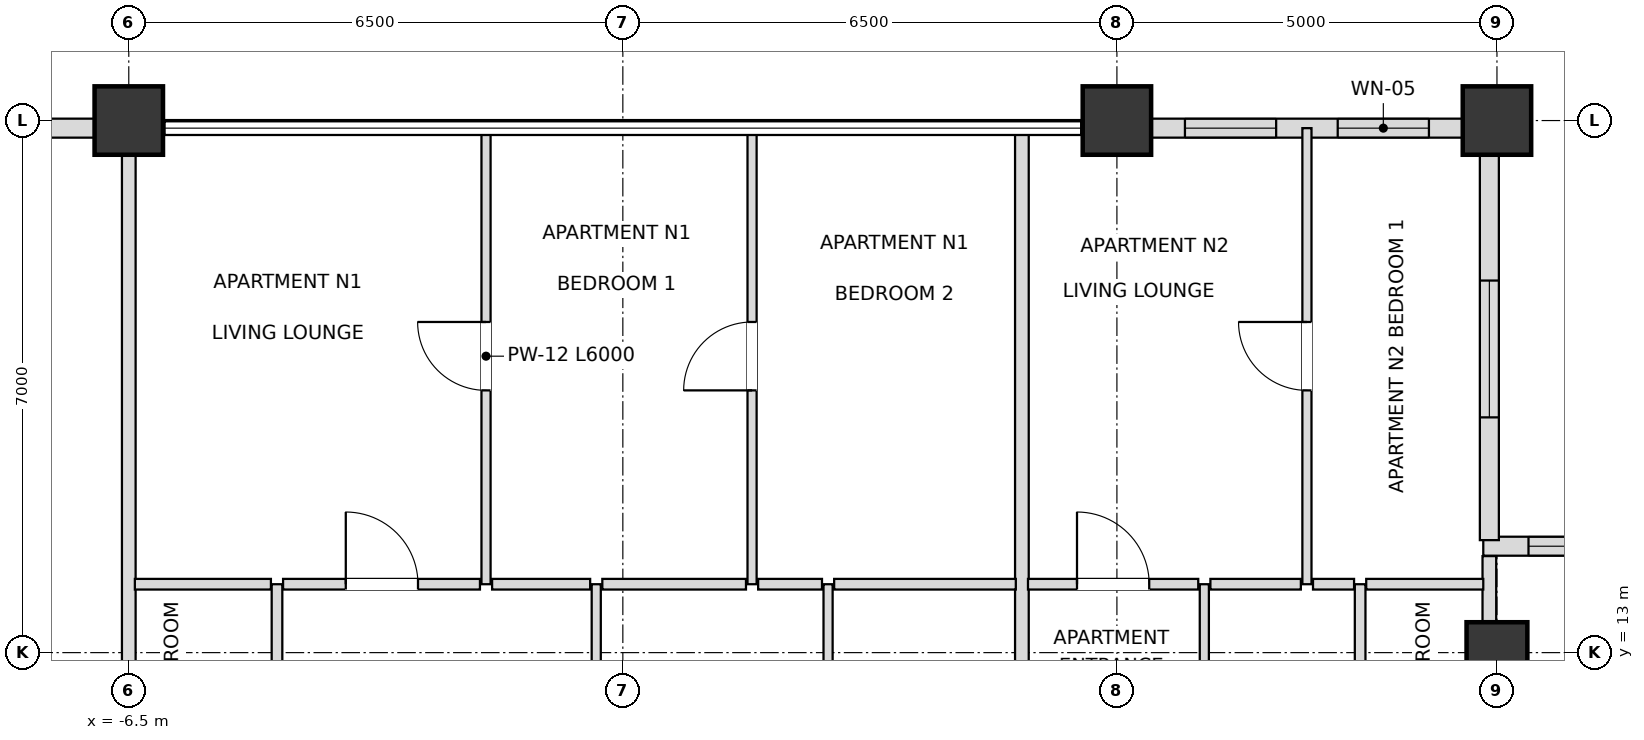
"""IFC4 building model, lengths in metres.
Left out: names, types, materials, properties, quantities, classifications, styles, units other than length and angle.
Written with IfcOpenShell. Run it as: python <this file> out.ifc"""

import sys

from ifc_helpers import new_model, si_unit, direction, frame, frame_2d, origin, origin_2d, place, context, subcontext, project, spatial, rectangle, extrude, element, fill, save


model = new_model("IFC4")
c1 = context("Model", 3, precision=1e-05, world=origin(), true_north=direction((0.0, 1.0)))
c2 = subcontext(c1, "Body", "Model", "MODEL_VIEW")
j1 = project(units=[si_unit("LENGTHUNIT", "METRE"), si_unit("PLANEANGLEUNIT", "RADIAN")], contexts=[c1])
p1 = place(None, origin())
s1 = spatial("IfcSite", under=j1, at=p1, CompositionType="ELEMENT")
p2 = place(p1, origin())
s2 = spatial("IfcBuilding", under=s1, at=p2, CompositionType="ELEMENT")
p3 = place(p2, frame((0.0, 0.0, 225.9)))
s3 = spatial("IfcBuildingStorey", under=s2, at=p3, CompositionType="ELEMENT", Elevation=225.9)
for number, where, z_axis, x_axis in (
    (1, (11.5, 20.0, 0.0), (0.0, 0.0, 1.0), (1.0, 0.0, 0.0)),
    (2, (6.5, 20.0, 0.0), (0.0, 0.0, 1.0), (1.0, 0.0, 0.0)),
    (3, (-6.5, 20.0, 0.0), (0.0, 0.0, 1.0), (1.0, 0.0, 0.0)),
):
    element("IfcColumn", number, at=place(p3, frame(where, z_axis=z_axis, x_axis=x_axis)), inside=s3, PredefinedType="USERDEFINED", context=c2, shape_type="SweptSolid", body=[
        extrude(rectangle(XDim=0.9, YDim=0.9, at=origin_2d()), origin(), (0.0, 0.0, 1.0), 3.6),
    ])
p4 = place(p3, frame((11.5, 13.0, 0.0), z_axis=(0.0, 0.0, 1.0), x_axis=(1.0, 0.0, 0.0)))
e4 = element("IfcColumn", 4, at=p4, inside=s3, PredefinedType="COLUMN", context=c2, shape_type="SweptSolid", body=[
    extrude(rectangle(XDim=0.8, YDim=0.8, at=origin_2d()), origin(), (0.0, 0.0, 1.0), 3.6),
])
p5 = place(p3, frame((11.055, 19.9, 0.0), z_axis=(0.0, 0.0, 1.0), x_axis=(-1.0, 0.0, 0.0)))
e5 = element("IfcWall", 5, at=p5, inside=s3, PredefinedType="SOLIDWALL", context=c2, shape_type="SweptSolid", body=[
    extrude(rectangle(XDim=4.11, YDim=0.25, at=frame_2d((2.055, 0.0))), origin(), (0.0, 0.0, 1.0), 2.748),
])
p6 = place(p5, frame((0.45, 0.0, 0.72)))
e6 = element("IfcOpeningElement", 6, at=p6, cuts=e5, PredefinedType="OPENING", context=c2, shape_type="SweptSolid", body=[
    extrude(rectangle(XDim=1.2, YDim=1.68, at=frame_2d((0.6, 0.84))), frame((0.0, 0.135, 0.0), z_axis=(0.0, -1.0, 0.0), x_axis=(1.0, 0.0, 0.0)), (0.0, 0.0, 1.0), 0.27),
])
p7 = place(p5, frame((2.46, 0.0, 0.72)))
e7 = element("IfcOpeningElement", 7, at=p7, cuts=e5, PredefinedType="OPENING", context=c2, shape_type="SweptSolid", body=[
    extrude(rectangle(XDim=1.2, YDim=1.68, at=frame_2d((0.6, 0.84))), frame((0.0, 0.135, 0.0), z_axis=(0.0, -1.0, 0.0), x_axis=(1.0, 0.0, 0.0)), (0.0, 0.0, 1.0), 0.27),
])
p8 = place(p3, frame((-6.945, 19.9, 0.0), z_axis=(0.0, 0.0, 1.0), x_axis=(-1.0, 0.0, 0.0)))
e8 = element("IfcWall", 8, at=p8, inside=s3, PredefinedType="SOLIDWALL", context=c2, shape_type="SweptSolid", body=[
    extrude(rectangle(XDim=4.11, YDim=0.25, at=frame_2d((2.055, 0.0))), origin(), (0.0, 0.0, 1.0), 2.748),
])
p9 = place(p8, frame((1.155, 0.0, 0.72)))
e9 = element("IfcOpeningElement", 9, at=p9, cuts=e8, PredefinedType="OPENING", context=c2, shape_type="SweptSolid", body=[
    extrude(rectangle(XDim=1.8, YDim=1.68, at=frame_2d((0.9, 0.84))), frame((0.0, 0.135, 0.0), z_axis=(0.0, -1.0, 0.0), x_axis=(1.0, 0.0, 0.0)), (0.0, 0.0, 1.0), 0.27),
])
p10 = place(p3, frame((16.98, 14.4, 0.0), z_axis=(0.0, 0.0, 1.0), x_axis=(-1.0, 0.0, 0.0)))
e10 = element("IfcWall", 10, at=p10, inside=s3, PredefinedType="SOLIDWALL", context=c2, shape_type="SweptSolid", body=[
    extrude(rectangle(XDim=5.66, YDim=0.25, at=frame_2d((2.83, 0.0))), origin(), (0.0, 0.0, 1.0), 2.748),
])
p11 = place(p10, frame((0.595, 0.0, 0.72)))
e11 = element("IfcOpeningElement", 11, at=p11, cuts=e10, PredefinedType="OPENING", context=c2, shape_type="SweptSolid", body=[
    extrude(rectangle(XDim=1.8, YDim=1.68, at=frame_2d((0.9, 0.84))), frame((0.0, 0.135, 0.0), z_axis=(0.0, -1.0, 0.0), x_axis=(1.0, 0.0, 0.0)), (0.0, 0.0, 1.0), 0.27),
])
p12 = place(p10, frame((3.265, 0.0, 0.72)))
e12 = element("IfcOpeningElement", 12, at=p12, cuts=e10, PredefinedType="OPENING", context=c2, shape_type="SweptSolid", body=[
    extrude(rectangle(XDim=1.8, YDim=1.68, at=frame_2d((0.9, 0.84))), frame((0.0, 0.135, 0.0), z_axis=(0.0, -1.0, 0.0), x_axis=(1.0, 0.0, 0.0)), (0.0, 0.0, 1.0), 0.27),
])
p13 = place(p3, frame((11.4, 14.48, 0.0), z_axis=(0.0, 0.0, 1.0), x_axis=(0.0, 1.0, 0.0)))
e13 = element("IfcWall", 13, at=p13, inside=s3, PredefinedType="SOLIDWALL", context=c2, shape_type="SweptSolid", body=[
    extrude(rectangle(XDim=5.34, YDim=0.25, at=frame_2d((2.67, 0.0))), origin(), (0.0, 0.0, 1.0), 2.748),
])
p14 = place(p13, frame((1.615, 0.0, 0.72)))
e14 = element("IfcOpeningElement", 14, at=p14, cuts=e13, PredefinedType="OPENING", context=c2, shape_type="SweptSolid", body=[
    extrude(rectangle(XDim=1.8, YDim=1.68, at=frame_2d((0.9, 0.84))), frame((0.0, 0.135, 0.0), z_axis=(0.0, -1.0, 0.0), x_axis=(1.0, 0.0, 0.0)), (0.0, 0.0, 1.0), 0.27),
])
p15 = place(p3, frame((-6.5, 9.2, 0.0), z_axis=(0.0, 0.0, 1.0), x_axis=(0.0, 1.0, 0.0)))
e15 = element("IfcWall", 15, at=p15, inside=s3, PredefinedType="PARTITIONING", context=c2, shape_type="SweptSolid", body=[
    extrude(rectangle(XDim=10.7, YDim=0.18, at=frame_2d((5.35, 0.0))), origin(), (0.0, 0.0, 1.0), 2.826),
])
p16 = place(p3, frame((-4.55, 9.2, 0.0), z_axis=(0.0, 0.0, 1.0), x_axis=(0.0, 1.0, 0.0)))
e16 = element("IfcWall", 16, at=p16, inside=s3, PredefinedType="PARTITIONING", context=c2, shape_type="SweptSolid", body=[
    extrude(rectangle(XDim=4.7, YDim=0.14, at=frame_2d((2.35, 0.0))), origin(), (0.0, 0.0, 1.0), 3.38),
])
p17 = place(p16, frame((1.9, 0.0, 0.0)))
e17 = element("IfcOpeningElement", 17, at=p17, cuts=e16, PredefinedType="OPENING", context=c2, shape_type="SweptSolid", body=[
    extrude(rectangle(XDim=0.9, YDim=2.1, at=frame_2d((0.45, 1.05))), frame((0.0, 0.08, 0.0), z_axis=(0.0, -1.0, 0.0), x_axis=(1.0, 0.0, 0.0)), (0.0, 0.0, 1.0), 0.16),
])
p18 = place(p3, frame((-1.8, 13.9, 0.0), z_axis=(0.0, 0.0, 1.0), x_axis=(0.0, 1.0, 0.0)))
e18 = element("IfcWall", 18, at=p18, inside=s3, PredefinedType="PARTITIONING", context=c2, shape_type="SweptSolid", body=[
    extrude(rectangle(XDim=6.0, YDim=0.12, at=frame_2d((3.0, 0.0))), origin(), (0.0, 0.0, 1.0), 3.018),
])
p19 = place(p18, frame((2.55, 0.0, 0.0)))
e19 = element("IfcOpeningElement", 19, at=p19, cuts=e18, PredefinedType="OPENING", context=c2, shape_type="SweptSolid", body=[
    extrude(rectangle(XDim=0.9, YDim=2.1, at=frame_2d((0.45, 1.05))), frame((0.0, 0.07, 0.0), z_axis=(0.0, -1.0, 0.0), x_axis=(1.0, 0.0, 0.0)), (0.0, 0.0, 1.0), 0.14),
])
p20 = place(p3, frame((-0.35, 9.2, 0.0), z_axis=(0.0, 0.0, 1.0), x_axis=(0.0, 1.0, 0.0)))
e20 = element("IfcWall", 20, at=p20, inside=s3, PredefinedType="PARTITIONING", context=c2, shape_type="SweptSolid", body=[
    extrude(rectangle(XDim=4.7, YDim=0.12, at=frame_2d((2.35, 0.0))), origin(), (0.0, 0.0, 1.0), 3.38),
])
p21 = place(p20, frame((1.875, 0.0, 0.0)))
e21 = element("IfcOpeningElement", 21, at=p21, cuts=e20, PredefinedType="OPENING", context=c2, shape_type="SweptSolid", body=[
    extrude(rectangle(XDim=0.95, YDim=2.1, at=frame_2d((0.475, 1.05))), frame((0.0, 0.07, 0.0), z_axis=(0.0, -1.0, 0.0), x_axis=(1.0, 0.0, 0.0)), (0.0, 0.0, 1.0), 0.14),
])
p22 = place(p3, frame((1.7, 13.9, 0.0), z_axis=(0.0, 0.0, 1.0), x_axis=(0.0, 1.0, 0.0)))
e22 = element("IfcWall", 22, at=p22, inside=s3, PredefinedType="PARTITIONING", context=c2, shape_type="SweptSolid", body=[
    extrude(rectangle(XDim=6.0, YDim=0.12, at=frame_2d((3.0, 0.0))), origin(), (0.0, 0.0, 1.0), 3.018),
])
p23 = place(p22, frame((2.55, 0.0, 0.0)))
e23 = element("IfcOpeningElement", 23, at=p23, cuts=e22, PredefinedType="OPENING", context=c2, shape_type="SweptSolid", body=[
    extrude(rectangle(XDim=0.9, YDim=2.1, at=frame_2d((0.45, 1.05))), frame((0.0, 0.07, 0.0), z_axis=(0.0, -1.0, 0.0), x_axis=(1.0, 0.0, 0.0)), (0.0, 0.0, 1.0), 0.14),
])
p24 = place(p3, frame((2.7, 9.2, 0.0), z_axis=(0.0, 0.0, 1.0), x_axis=(0.0, 1.0, 0.0)))
e24 = element("IfcWall", 24, at=p24, inside=s3, PredefinedType="PARTITIONING", context=c2, shape_type="SweptSolid", body=[
    extrude(rectangle(XDim=4.7, YDim=0.12, at=frame_2d((2.35, 0.0))), origin(), (0.0, 0.0, 1.0), 3.38),
])
p25 = place(p24, frame((1.9, 0.0, 0.0)))
e25 = element("IfcOpeningElement", 25, at=p25, cuts=e24, PredefinedType="OPENING", context=c2, shape_type="SweptSolid", body=[
    extrude(rectangle(XDim=0.9, YDim=2.1, at=frame_2d((0.45, 1.05))), frame((0.0, 0.07, 0.0), z_axis=(0.0, -1.0, 0.0), x_axis=(1.0, 0.0, 0.0)), (0.0, 0.0, 1.0), 0.14),
])
p26 = place(p3, frame((5.25, 9.2, 0.0), z_axis=(0.0, 0.0, 1.0), x_axis=(0.0, 1.0, 0.0)))
e26 = element("IfcWall", 26, at=p26, inside=s3, PredefinedType="PARTITIONING", context=c2, shape_type="SweptSolid", body=[
    extrude(rectangle(XDim=10.7, YDim=0.18, at=frame_2d((5.35, 0.0))), origin(), (0.0, 0.0, 1.0), 3.018),
])
p27 = place(p3, frame((7.65, 9.2, 0.0), z_axis=(0.0, 0.0, 1.0), x_axis=(0.0, 1.0, 0.0)))
e27 = element("IfcWall", 27, at=p27, inside=s3, PredefinedType="PARTITIONING", context=c2, shape_type="SweptSolid", body=[
    extrude(rectangle(XDim=4.7, YDim=0.12, at=frame_2d((2.35, 0.0))), origin(), (0.0, 0.0, 1.0), 2.826),
])
p28 = place(p27, frame((1.875, 0.0, 0.0)))
e28 = element("IfcOpeningElement", 28, at=p28, cuts=e27, PredefinedType="OPENING", context=c2, shape_type="SweptSolid", body=[
    extrude(rectangle(XDim=0.95, YDim=2.1, at=frame_2d((0.475, 1.05))), frame((0.0, 0.07, 0.0), z_axis=(0.0, -1.0, 0.0), x_axis=(1.0, 0.0, 0.0)), (0.0, 0.0, 1.0), 0.14),
])
p29 = place(p3, frame((9.0, 13.9, 0.0), z_axis=(0.0, 0.0, 1.0), x_axis=(0.0, 1.0, 0.0)))
e29 = element("IfcWall", 29, at=p29, inside=s3, PredefinedType="PARTITIONING", context=c2, shape_type="SweptSolid", body=[
    extrude(rectangle(XDim=6.0, YDim=0.12, at=frame_2d((3.0, 0.0))), origin(), (0.0, 0.0, 1.0), 3.38),
])
p30 = place(p29, frame((2.55, 0.0, 0.0)))
e30 = element("IfcOpeningElement", 30, at=p30, cuts=e29, PredefinedType="OPENING", context=c2, shape_type="SweptSolid", body=[
    extrude(rectangle(XDim=0.9, YDim=2.1, at=frame_2d((0.45, 1.05))), frame((0.0, 0.07, 0.0), z_axis=(0.0, -1.0, 0.0), x_axis=(1.0, 0.0, 0.0)), (0.0, 0.0, 1.0), 0.14),
])
p31 = place(p3, frame((9.7, 9.2, 0.0), z_axis=(0.0, 0.0, 1.0), x_axis=(0.0, 1.0, 0.0)))
e31 = element("IfcWall", 31, at=p31, inside=s3, PredefinedType="PARTITIONING", context=c2, shape_type="SweptSolid", body=[
    extrude(rectangle(XDim=4.7, YDim=0.14, at=frame_2d((2.35, 0.0))), origin(), (0.0, 0.0, 1.0), 2.826),
])
p32 = place(p31, frame((1.9, 0.0, 0.0)))
e32 = element("IfcOpeningElement", 32, at=p32, cuts=e31, PredefinedType="OPENING", context=c2, shape_type="SweptSolid", body=[
    extrude(rectangle(XDim=0.9, YDim=2.1, at=frame_2d((0.45, 1.05))), frame((0.0, 0.08, 0.0), z_axis=(0.0, -1.0, 0.0), x_axis=(1.0, 0.0, 0.0)), (0.0, 0.0, 1.0), 0.16),
])
p33 = place(p3, frame((11.4, 9.2, 0.0), z_axis=(0.0, 0.0, 1.0), x_axis=(0.0, 1.0, 0.0)))
e33 = element("IfcWall", 33, at=p33, inside=s3, PredefinedType="PARTITIONING", context=c2, shape_type="SweptSolid", body=[
    extrude(rectangle(XDim=5.07, YDim=0.18, at=frame_2d((2.535, 0.0))), origin(), (0.0, 0.0, 1.0), 2.748),
])
p34 = place(p3, frame((-6.42, 13.9, 0.0), z_axis=(0.0, 0.0, 1.0), x_axis=(1.0, 0.0, 0.0)))
e34 = element("IfcWall", 34, at=p34, inside=s3, PredefinedType="PARTITIONING", context=c2, shape_type="SweptSolid", body=[
    extrude(rectangle(XDim=1.79, YDim=0.14, at=frame_2d((0.895, 0.0))), origin(), (0.0, 0.0, 1.0), 3.38),
])
p35 = place(p3, frame((-4.47, 13.9, 0.0), z_axis=(0.0, 0.0, 1.0), x_axis=(1.0, 0.0, 0.0)))
e35 = element("IfcWall", 35, at=p35, inside=s3, PredefinedType="PARTITIONING", context=c2, shape_type="SweptSolid", body=[
    extrude(rectangle(XDim=2.59, YDim=0.14, at=frame_2d((1.295, 0.0))), origin(), (0.0, 0.0, 1.0), 3.38),
])
p36 = place(p35, frame((0.825, 0.0, 0.0)))
e36 = element("IfcOpeningElement", 36, at=p36, cuts=e35, PredefinedType="OPENING", context=c2, shape_type="SweptSolid", body=[
    extrude(rectangle(XDim=0.95, YDim=2.1, at=frame_2d((0.475, 1.05))), frame((0.0, 0.08, 0.0), z_axis=(0.0, -1.0, 0.0), x_axis=(1.0, 0.0, 0.0)), (0.0, 0.0, 1.0), 0.16),
])
p37 = place(p3, frame((-1.72, 13.9, 0.0), z_axis=(0.0, 0.0, 1.0), x_axis=(1.0, 0.0, 0.0)))
e37 = element("IfcWall", 37, at=p37, inside=s3, PredefinedType="PARTITIONING", context=c2, shape_type="SweptSolid", body=[
    extrude(rectangle(XDim=1.29, YDim=0.14, at=frame_2d((0.645, 0.0))), origin(), (0.0, 0.0, 1.0), 3.38),
])
p38 = place(p3, frame((-0.27, 13.9, 0.0), z_axis=(0.0, 0.0, 1.0), x_axis=(1.0, 0.0, 0.0)))
e38 = element("IfcWall", 38, at=p38, inside=s3, PredefinedType="PARTITIONING", context=c2, shape_type="SweptSolid", body=[
    extrude(rectangle(XDim=1.89, YDim=0.14, at=frame_2d((0.945, 0.0))), origin(), (0.0, 0.0, 1.0), 3.38),
])
p39 = place(p3, frame((1.78, 13.9, 0.0), z_axis=(0.0, 0.0, 1.0), x_axis=(1.0, 0.0, 0.0)))
e39 = element("IfcWall", 39, at=p39, inside=s3, PredefinedType="PARTITIONING", context=c2, shape_type="SweptSolid", body=[
    extrude(rectangle(XDim=0.84, YDim=0.14, at=frame_2d((0.42, 0.0))), origin(), (0.0, 0.0, 1.0), 3.38),
])
p40 = place(p3, frame((2.78, 13.9, 0.0), z_axis=(0.0, 0.0, 1.0), x_axis=(1.0, 0.0, 0.0)))
e40 = element("IfcWall", 40, at=p40, inside=s3, PredefinedType="PARTITIONING", context=c2, shape_type="SweptSolid", body=[
    extrude(rectangle(XDim=2.39, YDim=0.14, at=frame_2d((1.195, 0.0))), origin(), (0.0, 0.0, 1.0), 3.38),
])
p41 = place(p3, frame((5.33, 13.9, 0.0), z_axis=(0.0, 0.0, 1.0), x_axis=(1.0, 0.0, 0.0)))
e41 = element("IfcWall", 41, at=p41, inside=s3, PredefinedType="PARTITIONING", context=c2, shape_type="SweptSolid", body=[
    extrude(rectangle(XDim=2.24, YDim=0.14, at=frame_2d((1.12, 0.0))), origin(), (0.0, 0.0, 1.0), 2.826),
])
p42 = place(p41, frame((0.645, 0.0, 0.0)))
e42 = element("IfcOpeningElement", 42, at=p42, cuts=e41, PredefinedType="OPENING", context=c2, shape_type="SweptSolid", body=[
    extrude(rectangle(XDim=0.95, YDim=2.1, at=frame_2d((0.475, 1.05))), frame((0.0, 0.08, 0.0), z_axis=(0.0, -1.0, 0.0), x_axis=(1.0, 0.0, 0.0)), (0.0, 0.0, 1.0), 0.16),
])
p43 = place(p3, frame((7.73, 13.9, 0.0), z_axis=(0.0, 0.0, 1.0), x_axis=(1.0, 0.0, 0.0)))
e43 = element("IfcWall", 43, at=p43, inside=s3, PredefinedType="PARTITIONING", context=c2, shape_type="SweptSolid", body=[
    extrude(rectangle(XDim=1.19, YDim=0.14, at=frame_2d((0.595, 0.0))), origin(), (0.0, 0.0, 1.0), 3.38),
])
p44 = place(p3, frame((9.08, 13.9, 0.0), z_axis=(0.0, 0.0, 1.0), x_axis=(1.0, 0.0, 0.0)))
e44 = element("IfcWall", 44, at=p44, inside=s3, PredefinedType="PARTITIONING", context=c2, shape_type="SweptSolid", body=[
    extrude(rectangle(XDim=0.54, YDim=0.14, at=frame_2d((0.27, 0.0))), origin(), (0.0, 0.0, 1.0), 3.38),
])
p45 = place(p3, frame((9.78, 13.9, 0.0), z_axis=(0.0, 0.0, 1.0), x_axis=(1.0, 0.0, 0.0)))
e45 = element("IfcWall", 45, at=p45, inside=s3, PredefinedType="PARTITIONING", context=c2, shape_type="SweptSolid", body=[
    extrude(rectangle(XDim=1.54, YDim=0.14, at=frame_2d((0.77, 0.0))), origin(), (0.0, 0.0, 1.0), 3.38),
])
p46 = place(p6, origin())
e46 = element("IfcWindow", 46, at=p46, inside=s3, PartitioningType="SINGLE_PANEL", PredefinedType="WINDOW", context=c2, shape_type="SweptSolid", body=[
    extrude(rectangle(XDim=1.2, YDim=1.68, at=frame_2d((0.6, 0.84))), frame((0.0, 0.03, 0.0), z_axis=(0.0, -1.0, 0.0), x_axis=(1.0, 0.0, 0.0)), (0.0, 0.0, 1.0), 0.06),
])
fill(e6, e46)
p47 = place(p7, origin())
e47 = element("IfcWindow", 47, at=p47, inside=s3, PartitioningType="SINGLE_PANEL", PredefinedType="WINDOW", context=c2, shape_type="SweptSolid", body=[
    extrude(rectangle(XDim=1.2, YDim=1.68, at=frame_2d((0.6, 0.84))), frame((0.0, 0.03, 0.0), z_axis=(0.0, -1.0, 0.0), x_axis=(1.0, 0.0, 0.0)), (0.0, 0.0, 1.0), 0.06),
])
fill(e7, e47)
p48 = place(p12, origin())
e48 = element("IfcWindow", 48, at=p48, inside=s3, PartitioningType="SINGLE_PANEL", PredefinedType="WINDOW", context=c2, shape_type="SweptSolid", body=[
    extrude(rectangle(XDim=1.8, YDim=1.68, at=frame_2d((0.9, 0.84))), frame((0.0, 0.03, 0.0), z_axis=(0.0, -1.0, 0.0), x_axis=(1.0, 0.0, 0.0)), (0.0, 0.0, 1.0), 0.06),
])
fill(e12, e48)
p49 = place(p14, origin())
e49 = element("IfcWindow", 49, at=p49, inside=s3, PartitioningType="SINGLE_PANEL", PredefinedType="WINDOW", context=c2, shape_type="SweptSolid", body=[
    extrude(rectangle(XDim=1.8, YDim=1.68, at=frame_2d((0.9, 0.84))), frame((0.0, 0.03, 0.0), z_axis=(0.0, -1.0, 0.0), x_axis=(1.0, 0.0, 0.0)), (0.0, 0.0, 1.0), 0.06),
])
fill(e14, e49)
p50 = place(p36, origin())
e50 = element("IfcDoor", 50, at=p50, inside=s3, OperationType="SINGLE_SWING_LEFT", PredefinedType="DOOR", context=c2, shape_type="SweptSolid", body=[
    extrude(rectangle(XDim=0.95, YDim=2.1, at=frame_2d((0.475, 1.05))), frame((0.0, 0.025, 0.0), z_axis=(0.0, -1.0, 0.0), x_axis=(1.0, 0.0, 0.0)), (0.0, 0.0, 1.0), 0.05),
])
fill(e36, e50)
p51 = place(p19, origin())
e51 = element("IfcDoor", 51, at=p51, inside=s3, OperationType="SINGLE_SWING_RIGHT", PredefinedType="DOOR", context=c2, shape_type="SweptSolid", body=[
    extrude(rectangle(XDim=0.9, YDim=2.1, at=frame_2d((0.45, 1.05))), frame((0.0, 0.025, 0.0), z_axis=(0.0, -1.0, 0.0), x_axis=(1.0, 0.0, 0.0)), (0.0, 0.0, 1.0), 0.05),
])
fill(e19, e51)
p52 = place(p23, origin())
e52 = element("IfcDoor", 52, at=p52, inside=s3, OperationType="SINGLE_SWING_LEFT", PredefinedType="DOOR", context=c2, shape_type="SweptSolid", body=[
    extrude(rectangle(XDim=0.9, YDim=2.1, at=frame_2d((0.45, 1.05))), frame((0.0, 0.025, 0.0), z_axis=(0.0, -1.0, 0.0), x_axis=(1.0, 0.0, 0.0)), (0.0, 0.0, 1.0), 0.05),
])
fill(e23, e52)
p53 = place(p42, origin())
e53 = element("IfcDoor", 53, at=p53, inside=s3, OperationType="SINGLE_SWING_LEFT", PredefinedType="DOOR", context=c2, shape_type="SweptSolid", body=[
    extrude(rectangle(XDim=0.95, YDim=2.1, at=frame_2d((0.475, 1.05))), frame((0.0, 0.025, 0.0), z_axis=(0.0, -1.0, 0.0), x_axis=(1.0, 0.0, 0.0)), (0.0, 0.0, 1.0), 0.05),
])
fill(e42, e53)
p54 = place(p30, origin())
e54 = element("IfcDoor", 54, at=p54, inside=s3, OperationType="SINGLE_SWING_RIGHT", PredefinedType="DOOR", context=c2, shape_type="SweptSolid", body=[
    extrude(rectangle(XDim=0.9, YDim=2.1, at=frame_2d((0.45, 1.05))), frame((0.0, 0.025, 0.0), z_axis=(0.0, -1.0, 0.0), x_axis=(1.0, 0.0, 0.0)), (0.0, 0.0, 1.0), 0.05),
])
fill(e30, e54)
save(model, sys.argv[1])
